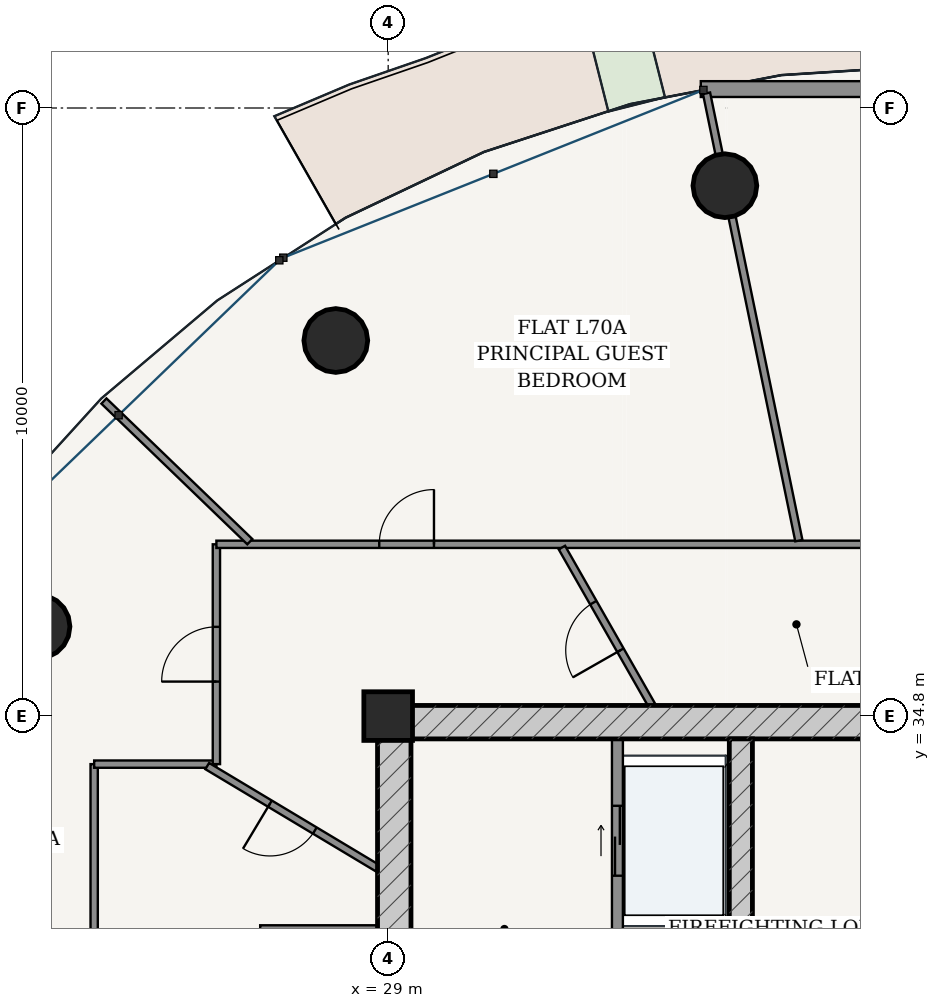
"""IFC4 building model, lengths in metres.
Left out: names, types, materials, properties, quantities, classifications, styles, units other than length and angle.
Written with IfcOpenShell. Run it as: python <this file> out.ifc"""

import sys

from ifc_helpers import new_model, si_unit, direction, frame, frame_2d, origin, origin_2d, place, context, subcontext, project, spatial, rectangle, hollow_circle, extrude, source, transform, mapped, element, fill, save


model = new_model("IFC4")
c1 = context("Model", 3, precision=1e-05, world=origin(), true_north=direction((-0.2419218956, 0.970295726276)))
c2 = subcontext(c1, "Body", "Model", "MODEL_VIEW")
j1 = project(units=[si_unit("LENGTHUNIT", "METRE"), si_unit("PLANEANGLEUNIT", "RADIAN")], contexts=[c1])
p1 = place(None, origin())
s1 = spatial("IfcSite", under=j1, at=p1, CompositionType="ELEMENT")
p2 = place(p1, origin())
s2 = spatial("IfcBuilding", under=s1, at=p2, CompositionType="ELEMENT")
p3 = place(p2, frame((0.0, 0.0, 266.95)))
s3 = spatial("IfcBuildingStorey", under=s2, at=p3, CompositionType="ELEMENT", Elevation=266.95)
p4 = place(p3, frame((29.0, 34.8, 0.0), z_axis=(0.0, 0.0, 1.0), x_axis=(1.0, 0.0, 0.0)))
e1 = element("IfcColumn", 1, at=p4, inside=s3, PredefinedType="COLUMN", context=c2, shape_type="SweptSolid", body=[
    extrude(rectangle(XDim=0.8, YDim=0.8, at=origin_2d()), origin(), (0.0, 0.0, 1.0), 3.75),
])
p5 = place(p3, frame((28.825, 34.7, 0.0), z_axis=(0.0, 0.0, 1.0), x_axis=(1.0, 0.0, 0.0)))
e2 = element("IfcWall", 2, at=p5, inside=s3, PredefinedType="SHEAR", context=c2, shape_type="SweptSolid", body=[
    extrude(rectangle(XDim=18.35, YDim=0.55, at=frame_2d((9.175, 0.0))), origin(), (0.0, 0.0, 1.0), 3.49),
])
p6 = place(p3, frame((29.1, 19.175, 0.0), z_axis=(0.0, 0.0, 1.0), x_axis=(0.0, 1.0, 0.0)))
e3 = element("IfcWall", 3, at=p6, inside=s3, PredefinedType="SHEAR", context=c2, shape_type="SweptSolid", body=[
    extrude(rectangle(XDim=15.25, YDim=0.55, at=frame_2d((7.625, 0.0))), origin(), (0.0, 0.0, 1.0), 3.49),
])
p7 = place(p6, frame((9.875, 0.0, 0.0)))
e4 = element("IfcOpeningElement", 4, at=p7, cuts=e3, PredefinedType="OPENING", context=c2, shape_type="SweptSolid", body=[
    extrude(rectangle(XDim=1.5, YDim=2.2, at=frame_2d((0.75, 1.1))), frame((0.0, 0.285, 0.0), z_axis=(0.0, -1.0, 0.0), x_axis=(1.0, 0.0, 0.0)), (0.0, 0.0, 1.0), 0.57),
])
p8 = place(p3, frame((34.8, 19.175, 0.0), z_axis=(0.0, 0.0, 1.0), x_axis=(0.0, 1.0, 0.0)))
e5 = element("IfcWall", 5, at=p8, inside=s3, PredefinedType="SHEAR", context=c2, shape_type="SweptSolid", body=[
    extrude(rectangle(XDim=15.25, YDim=0.38, at=frame_2d((7.625, 0.0))), origin(), (0.0, 0.0, 1.0), 3.49),
])
p9 = place(p8, frame((7.8, 0.0, 0.0)))
e6 = element("IfcOpeningElement", 6, at=p9, cuts=e5, PredefinedType="OPENING", context=c2, shape_type="SweptSolid", body=[
    extrude(rectangle(XDim=1.05, YDim=2.15, at=frame_2d((0.525, 1.075))), frame((0.0, 0.2, 0.0), z_axis=(0.0, -1.0, 0.0), x_axis=(1.0, 0.0, 0.0)), (0.0, 0.0, 1.0), 0.4),
])
for number, where, z_axis, x_axis in (
    (7, (34.537, 43.522, 0.0), (0.0, 0.0, 1.0), (1.0, 0.0, 0.0)),
    (8, (28.139, 40.977, 0.0), (0.0, 0.0, 1.0), (1.0, 0.0, 0.0)),
    (9, (23.241, 36.272, 0.0), (0.0, 0.0, 1.0), (1.0, 0.0, 0.0)),
):
    element("IfcColumn", number, at=place(p3, frame(where, z_axis=z_axis, x_axis=x_axis)), inside=s3, PredefinedType="COLUMN", context=c2, shape_type="SweptSolid", body=[
        extrude(hollow_circle(Radius=0.525, WallThickness=0.035, at=origin_2d()), origin(), (0.0, 0.0, 1.0), 3.75),
    ])
p10 = place(p3, frame((41.859, 45.111, 0.0), z_axis=(0.0, 0.0, 1.0), x_axis=(-1.0, 0.0, 0.0)))
e10 = element("IfcWall", 10, at=p10, inside=s3, PredefinedType="SOLIDWALL", context=c2, shape_type="SweptSolid", body=[
    extrude(rectangle(XDim=7.718, YDim=0.26, at=frame_2d((3.859, 0.0))), origin(), (0.0, 0.0, 1.0), 3.49),
])
p11 = place(p10, frame((3.184, 0.0, 0.0)))
e11 = element("IfcOpeningElement", 11, at=p11, cuts=e10, PredefinedType="OPENING", context=c2, shape_type="SweptSolid", body=[
    extrude(rectangle(XDim=1.35, YDim=2.2, at=frame_2d((0.675, 1.1))), frame((0.0, 0.14, 0.0), z_axis=(0.0, -1.0, 0.0), x_axis=(1.0, 0.0, 0.0)), (0.0, 0.0, 1.0), 0.28),
])
p12 = place(p3, frame((32.77, 28.52, 0.0), z_axis=(0.0, 0.0, 1.0), x_axis=(0.0, 1.0, 0.0)))
e12 = element("IfcWall", 12, at=p12, inside=s3, PredefinedType="PARTITIONING", context=c2, shape_type="SweptSolid", body=[
    extrude(rectangle(XDim=5.905, YDim=0.18, at=frame_2d((2.953, 0.0))), origin(), (0.0, 0.0, 1.0), 3.49),
])
p13 = place(p12, frame((3.655, 0.0, 0.0)))
e13 = element("IfcOpeningElement", 13, at=p13, cuts=e12, PredefinedType="OPENING", context=c2, shape_type="SweptSolid", body=[
    extrude(rectangle(XDim=1.15, YDim=2.2, at=frame_2d((0.575, 1.1))), frame((0.0, 0.1, 0.0), z_axis=(0.0, -1.0, 0.0), x_axis=(1.0, 0.0, 0.0)), (0.0, 0.0, 1.0), 0.2),
])
p14 = place(p12, frame((0.73, 0.0, 0.0)))
e14 = element("IfcOpeningElement", 14, at=p14, cuts=e12, PredefinedType="OPENING", context=c2, shape_type="SweptSolid", body=[
    extrude(rectangle(XDim=1.2, YDim=2.25, at=frame_2d((0.6, 1.125))), frame((0.0, 0.1, 0.0), z_axis=(0.0, -1.0, 0.0), x_axis=(1.0, 0.0, 0.0)), (0.0, 0.0, 1.0), 0.2),
])
p15 = place(p3, frame((32.86, 31.22, 0.0), z_axis=(0.0, 0.0, 1.0), x_axis=(1.0, 0.0, 0.0)))
e15 = element("IfcWall", 15, at=p15, inside=s3, PredefinedType="PARTITIONING", context=c2, shape_type="SweptSolid", body=[
    extrude(rectangle(XDim=1.75, YDim=0.16, at=frame_2d((0.875, 0.0))), origin(), (0.0, 0.0, 1.0), 3.49),
])
p16 = place(p3, frame((26.895, 31.28, 0.0), z_axis=(0.0, 0.0, 1.0), x_axis=(1.0, 0.0, 0.0)))
e16 = element("IfcWall", 16, at=p16, inside=s3, PredefinedType="PARTITIONING", context=c2, shape_type="SweptSolid", body=[
    extrude(rectangle(XDim=1.93, YDim=0.16, at=frame_2d((0.965, 0.0))), origin(), (0.0, 0.0, 1.0), 3.49),
])
p17 = place(p3, frame((24.165, 26.902, 0.0), z_axis=(0.0, 0.0, 1.0), x_axis=(0.0, 1.0, 0.0)))
e17 = element("IfcWall", 17, at=p17, inside=s3, PredefinedType="PARTITIONING", context=c2, shape_type="SweptSolid", body=[
    extrude(rectangle(XDim=7.108, YDim=0.12, at=frame_2d((3.554, 0.0))), origin(), (0.0, 0.0, 1.0), 3.015),
])
p18 = place(p3, frame((24.165, 34.01, 0.0), z_axis=(0.0, 0.0, 1.0), x_axis=(1.0, 0.0, 0.0)))
e18 = element("IfcWall", 18, at=p18, inside=s3, PredefinedType="PARTITIONING", context=c2, shape_type="SweptSolid", body=[
    extrude(rectangle(XDim=2.01, YDim=0.12, at=frame_2d((1.005, 0.0))), origin(), (0.0, 0.0, 1.0), 3.209),
])
p19 = place(p3, frame((26.175, 34.01, 0.0), z_axis=(0.0, 0.0, 1.0), x_axis=(0.0, 1.0, 0.0)))
e19 = element("IfcWall", 19, at=p19, inside=s3, PredefinedType="PARTITIONING", context=c2, shape_type="SweptSolid", body=[
    extrude(rectangle(XDim=3.615, YDim=0.12, at=frame_2d((1.808, 0.0))), origin(), (0.0, 0.0, 1.0), 3.015),
])
p20 = place(p19, frame((1.357, 0.0, 0.0)))
e20 = element("IfcOpeningElement", 20, at=p20, cuts=e19, PredefinedType="OPENING", context=c2, shape_type="SweptSolid", body=[
    extrude(rectangle(XDim=0.9, YDim=2.15, at=frame_2d((0.45, 1.075))), frame((0.0, 0.07, 0.0), z_axis=(0.0, -1.0, 0.0), x_axis=(1.0, 0.0, 0.0)), (0.0, 0.0, 1.0), 0.14),
])
p21 = place(p3, frame((26.175, 37.625, 0.0), z_axis=(0.0, 0.0, 1.0), x_axis=(1.0, 0.0, 0.0)))
e21 = element("IfcWall", 21, at=p21, inside=s3, PredefinedType="PARTITIONING", context=c2, shape_type="SweptSolid", body=[
    extrude(rectangle(XDim=23.65, YDim=0.12, at=frame_2d((11.825, 0.0))), origin(), (0.0, 0.0, 1.0), 3.015),
])
p22 = place(p21, frame((14.733, 0.0, 0.0)))
e22 = element("IfcOpeningElement", 22, at=p22, cuts=e21, PredefinedType="OPENING", context=c2, shape_type="SweptSolid", body=[
    extrude(rectangle(XDim=0.9, YDim=2.15, at=frame_2d((0.45, 1.075))), frame((0.0, 0.07, 0.0), z_axis=(0.0, -1.0, 0.0), x_axis=(1.0, 0.0, 0.0)), (0.0, 0.0, 1.0), 0.14),
])
p23 = place(p21, frame((11.279, 0.0, 0.0)))
e23 = element("IfcOpeningElement", 23, at=p23, cuts=e21, PredefinedType="OPENING", context=c2, shape_type="SweptSolid", body=[
    extrude(rectangle(XDim=0.9, YDim=2.15, at=frame_2d((0.45, 1.075))), frame((0.0, 0.07, 0.0), z_axis=(0.0, -1.0, 0.0), x_axis=(1.0, 0.0, 0.0)), (0.0, 0.0, 1.0), 0.14),
])
p24 = place(p21, frame((2.678, 0.0, 0.0)))
e24 = element("IfcOpeningElement", 24, at=p24, cuts=e21, PredefinedType="OPENING", context=c2, shape_type="SweptSolid", body=[
    extrude(rectangle(XDim=0.9, YDim=2.15, at=frame_2d((0.45, 1.075))), frame((0.0, 0.07, 0.0), z_axis=(0.0, -1.0, 0.0), x_axis=(1.0, 0.0, 0.0)), (0.0, 0.0, 1.0), 0.14),
])
p25 = place(p3, frame((35.754, 37.686, 0.0), z_axis=(0.0, 0.0, 1.0), x_axis=(-0.202105877204, 0.979363678313, 0.0)))
e25 = element("IfcWall", 25, at=p25, inside=s3, PredefinedType="PARTITIONING", context=c2, shape_type="SweptSolid", body=[
    extrude(rectangle(XDim=7.512, YDim=0.12, at=frame_2d((3.756, 0.0))), origin(), (0.0, 0.0, 1.0), 3.015),
])
p26 = place(p3, frame((26.725, 37.668, 0.0), z_axis=(0.0, 0.0, 1.0), x_axis=(-0.719954096891, 0.694021684366, 0.0)))
e26 = element("IfcWall", 26, at=p26, inside=s3, PredefinedType="PARTITIONING", context=c2, shape_type="SweptSolid", body=[
    extrude(rectangle(XDim=3.333, YDim=0.12, at=frame_2d((1.667, 0.0))), origin(), (0.0, 0.0, 1.0), 3.121),
])
p27 = place(p3, frame((33.336, 34.977, 0.0), z_axis=(0.0, 0.0, 1.0), x_axis=(-0.495399243909, 0.868665406894, 0.0)))
e27 = element("IfcWall", 27, at=p27, inside=s3, PredefinedType="PARTITIONING", context=c2, shape_type="SweptSolid", body=[
    extrude(rectangle(XDim=2.987, YDim=0.12, at=frame_2d((1.493, 0.0))), origin(), (0.0, 0.0, 1.0), 3.49),
])
p28 = place(p27, frame((1.043, 0.0, 0.0)))
e28 = element("IfcOpeningElement", 28, at=p28, cuts=e27, PredefinedType="OPENING", context=c2, shape_type="SweptSolid", body=[
    extrude(rectangle(XDim=0.9, YDim=2.15, at=frame_2d((0.45, 1.075))), frame((0.0, 0.07, 0.0), z_axis=(0.0, -1.0, 0.0), x_axis=(1.0, 0.0, 0.0)), (0.0, 0.0, 1.0), 0.14),
])
p29 = place(p3, frame((28.825, 32.3, 0.0), z_axis=(0.0, 0.0, 1.0), x_axis=(-0.857743539935, 0.514077834282, 0.0)))
e29 = element("IfcWall", 29, at=p29, inside=s3, PredefinedType="PARTITIONING", context=c2, shape_type="SweptSolid", body=[
    extrude(rectangle(XDim=3.265, YDim=0.12, at=frame_2d((1.632, 0.0))), origin(), (0.0, 0.0, 1.0), 3.49),
])
p30 = place(p29, frame((1.202, 0.0, 0.0)))
e30 = element("IfcOpeningElement", 30, at=p30, cuts=e29, PredefinedType="OPENING", context=c2, shape_type="SweptSolid", body=[
    extrude(rectangle(XDim=0.86, YDim=2.15, at=frame_2d((0.43, 1.075))), frame((0.0, 0.07, 0.0), z_axis=(0.0, -1.0, 0.0), x_axis=(1.0, 0.0, 0.0)), (0.0, 0.0, 1.0), 0.14),
])
m1 = source(origin(), c2, "Body", "SweptSolid", [
    extrude(rectangle(XDim=1.15, YDim=2.2, at=frame_2d((0.575, 1.1))), frame((0.0, 0.025, 0.0), z_axis=(0.0, -1.0, 0.0), x_axis=(1.0, 0.0, 0.0)), (0.0, 0.0, 1.0), 0.05),
])
p31 = place(p13, origin())
e31 = element("IfcDoor", 31, at=p31, inside=s3, OperationType="DOUBLE_DOOR_SLIDING", PredefinedType="DOOR", context=c2, shape_type="MappedRepresentation", body=[
    mapped(m1, transform((0.0, 0.0, 0.0), scale=1.0)),
])
fill(e13, e31)
m2 = source(origin(), c2, "Body", "SweptSolid", [
    extrude(rectangle(XDim=0.9, YDim=2.15, at=frame_2d((0.45, 1.075))), frame((0.0, 0.025, 0.0), z_axis=(0.0, -1.0, 0.0), x_axis=(1.0, 0.0, 0.0)), (0.0, 0.0, 1.0), 0.05),
])
p32 = place(p28, origin())
e32 = element("IfcDoor", 32, at=p32, inside=s3, OperationType="SINGLE_SWING_LEFT", PredefinedType="DOOR", context=c2, shape_type="MappedRepresentation", body=[
    mapped(m2, transform((0.0, 0.0, 0.0), scale=1.0)),
])
fill(e28, e32)
m3 = source(origin(), c2, "Body", "SweptSolid", [
    extrude(rectangle(XDim=0.86, YDim=2.15, at=frame_2d((0.43, 1.075))), frame((0.0, 0.025, 0.0), z_axis=(0.0, -1.0, 0.0), x_axis=(1.0, 0.0, 0.0)), (0.0, 0.0, 1.0), 0.05),
])
p33 = place(p30, origin())
e33 = element("IfcDoor", 33, at=p33, inside=s3, OperationType="SINGLE_SWING_RIGHT", PredefinedType="DOOR", context=c2, shape_type="MappedRepresentation", body=[
    mapped(m3, transform((0.0, 0.0, 0.0), scale=1.0)),
])
fill(e30, e33)
p34 = place(p24, origin())
e34 = element("IfcDoor", 34, at=p34, inside=s3, OperationType="SINGLE_SWING_RIGHT", PredefinedType="DOOR", context=c2, shape_type="MappedRepresentation", body=[
    mapped(m2, transform((0.0, 0.0, 0.0), scale=1.0)),
])
fill(e24, e34)
p35 = place(p20, origin())
e35 = element("IfcDoor", 35, at=p35, inside=s3, OperationType="SINGLE_SWING_LEFT", PredefinedType="DOOR", context=c2, shape_type="MappedRepresentation", body=[
    mapped(m2, transform((0.0, 0.0, 0.0), scale=1.0)),
])
fill(e20, e35)
save(model, sys.argv[1])
